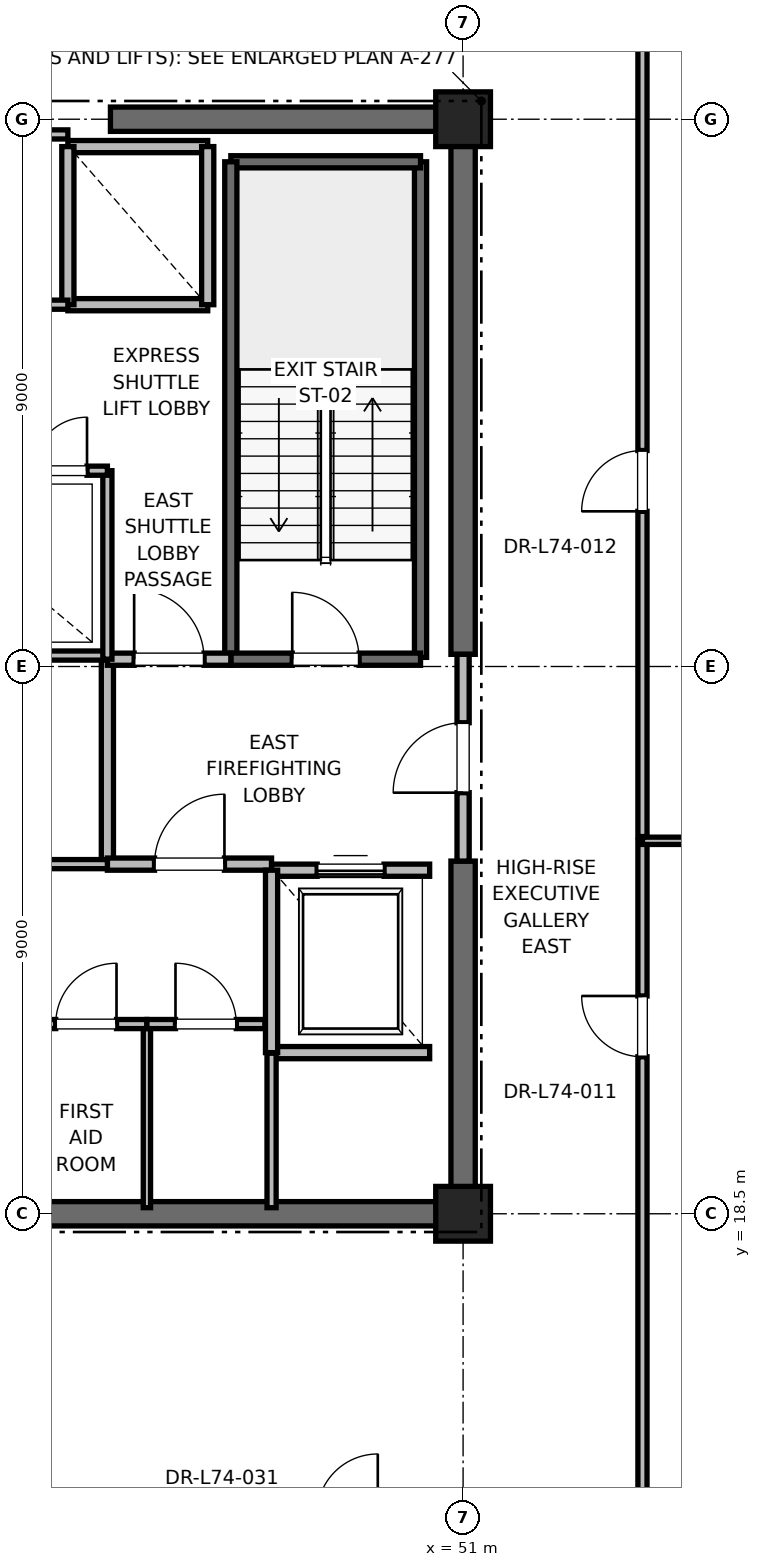
"""IFC4 building model, lengths in metres.
Left out: names, types, materials, properties, quantities, classifications, styles, units other than length and angle.
Written with IfcOpenShell. Run it as: python <this file> out.ifc"""

import sys

from ifc_helpers import new_model, si_unit, direction, frame, frame_2d, origin, origin_2d, place, context, subcontext, project, spatial, rectangle, extrude, element, fill, save


model = new_model("IFC4")
c1 = context("Model", 3, precision=1e-05, world=origin(), true_north=direction((0.0, 1.0)))
c2 = subcontext(c1, "Body", "Model", "MODEL_VIEW")
j1 = project(units=[si_unit("LENGTHUNIT", "METRE"), si_unit("PLANEANGLEUNIT", "RADIAN")], contexts=[c1])
p1 = place(None, origin())
s1 = spatial("IfcSite", under=j1, at=p1, CompositionType="ELEMENT")
p2 = place(p1, origin())
s2 = spatial("IfcBuilding", under=s1, at=p2, CompositionType="ELEMENT")
p3 = place(p2, frame((0.0, 0.0, 318.8)))
s3 = spatial("IfcBuildingStorey", under=s2, at=p3, CompositionType="ELEMENT", Elevation=318.8)
for number, where, z_axis, x_axis in (
    (1, (51.0, 18.5, 0.0), (0.0, 0.0, 1.0), (1.0, 0.0, 0.0)),
    (2, (51.0, 36.5, 0.0), (0.0, 0.0, 1.0), (1.0, 0.0, 0.0)),
):
    element("IfcColumn", number, at=place(p3, frame(where, z_axis=z_axis, x_axis=x_axis)), inside=s3, PredefinedType="PILASTER", context=c2, shape_type="SweptSolid", body=[
        extrude(rectangle(XDim=0.9, YDim=0.9, at=origin_2d()), origin(), (0.0, 0.0, 1.0), 4.0),
    ])
p4 = place(p3, frame((41.8, 18.5, 0.0), z_axis=(0.0, 0.0, 1.0), x_axis=(1.0, 0.0, 0.0)))
e3 = element("IfcWall", 3, at=p4, inside=s3, PredefinedType="SHEAR", context=c2, shape_type="SweptSolid", body=[
    extrude(rectangle(XDim=9.2, YDim=0.4, at=frame_2d((4.6, 0.0))), origin(), (0.0, 0.0, 1.0), 3.785),
])
for number, where, z_axis, x_axis in (
    (4, (45.2, 36.5, 0.0), (0.0, 0.0, 1.0), (1.0, 0.0, 0.0)),
    (5, (51.0, 18.5, 0.0), (0.0, 0.0, 1.0), (0.0, 1.0, 0.0)),
):
    element("IfcWall", number, at=place(p3, frame(where, z_axis=z_axis, x_axis=x_axis)), inside=s3, PredefinedType="SHEAR", context=c2, shape_type="SweptSolid", body=[
        extrude(rectangle(XDim=5.8, YDim=0.4, at=frame_2d((2.9, 0.0))), origin(), (0.0, 0.0, 1.0), 3.785),
    ])
p5 = place(p3, frame((51.0, 27.7, 0.0), z_axis=(0.0, 0.0, 1.0), x_axis=(0.0, 1.0, 0.0)))
e6 = element("IfcWall", 6, at=p5, inside=s3, PredefinedType="SHEAR", context=c2, shape_type="SweptSolid", body=[
    extrude(rectangle(XDim=8.8, YDim=0.4, at=frame_2d((4.4, 0.0))), origin(), (0.0, 0.0, 1.0), 3.785),
])
p6 = place(p3, frame((50.3, 27.65, 0.0), z_axis=(0.0, 0.0, 1.0), x_axis=(0.0, 1.0, 0.0)))
e7 = element("IfcWall", 7, at=p6, inside=s3, PredefinedType="SOLIDWALL", context=c2, shape_type="SweptSolid", body=[
    extrude(rectangle(XDim=8.15, YDim=0.2, at=frame_2d((4.075, 0.0))), origin(), (0.0, 0.0, 1.0), 3.785),
])
p7 = place(p3, frame((47.18, 35.8, 0.0), z_axis=(0.0, 0.0, 1.0), x_axis=(1.0, 0.0, 0.0)))
e8 = element("IfcWall", 8, at=p7, inside=s3, PredefinedType="SOLIDWALL", context=c2, shape_type="SweptSolid", body=[
    extrude(rectangle(XDim=3.12, YDim=0.2, at=frame_2d((1.56, 0.0))), origin(), (0.0, 0.0, 1.0), 3.785),
])
p8 = place(p3, frame((47.18, 27.62, 0.0), z_axis=(0.0, 0.0, 1.0), x_axis=(0.0, 1.0, 0.0)))
e9 = element("IfcWall", 9, at=p8, inside=s3, PredefinedType="SOLIDWALL", context=c2, shape_type="SweptSolid", body=[
    extrude(rectangle(XDim=8.18, YDim=0.2, at=frame_2d((4.09, 0.0))), origin(), (0.0, 0.0, 1.0), 3.785),
])
p9 = place(p3, frame((47.18, 27.62, 0.0), z_axis=(0.0, 0.0, 1.0), x_axis=(1.0, 0.0, 0.0)))
e10 = element("IfcWall", 10, at=p9, inside=s3, PredefinedType="SOLIDWALL", context=c2, shape_type="SweptSolid", body=[
    extrude(rectangle(XDim=3.12, YDim=0.2, at=frame_2d((1.56, 0.0))), origin(), (0.0, 0.0, 1.0), 3.785),
])
p10 = place(p9, frame((1.01, 0.0, 0.0)))
e11 = element("IfcOpeningElement", 11, at=p10, cuts=e10, PredefinedType="OPENING", context=c2, shape_type="SweptSolid", body=[
    extrude(rectangle(XDim=1.1, YDim=2.15, at=frame_2d((0.55, 1.075))), frame((0.0, 0.1, 0.0), z_axis=(0.0, -1.0, 0.0), x_axis=(1.0, 0.0, 0.0)), (0.0, 0.0, 1.0), 0.2),
])
p11 = place(p3, frame((45.15, 24.25, 0.0), z_axis=(0.0, 0.0, 1.0), x_axis=(0.0, 1.0, 0.0)))
e12 = element("IfcWall", 12, at=p11, inside=s3, PredefinedType="PARTITIONING", context=c2, shape_type="SweptSolid", body=[
    extrude(rectangle(XDim=3.37, YDim=0.2, at=frame_2d((1.685, 0.0))), origin(), (0.0, 0.0, 1.0), 3.785),
])
p12 = place(p3, frame((45.15, 24.25, 0.0), z_axis=(0.0, 0.0, 1.0), x_axis=(1.0, 0.0, 0.0)))
e13 = element("IfcWall", 13, at=p12, inside=s3, PredefinedType="PARTITIONING", context=c2, shape_type="SweptSolid", body=[
    extrude(rectangle(XDim=2.7, YDim=0.2, at=frame_2d((1.35, 0.0))), origin(), (0.0, 0.0, 1.0), 3.785),
])
p13 = place(p12, frame((0.775, 0.0, 0.0)))
e14 = element("IfcOpeningElement", 14, at=p13, cuts=e13, PredefinedType="OPENING", context=c2, shape_type="SweptSolid", body=[
    extrude(rectangle(XDim=1.15, YDim=2.2, at=frame_2d((0.575, 1.1))), frame((0.0, 0.1, 0.0), z_axis=(0.0, -1.0, 0.0), x_axis=(1.0, 0.0, 0.0)), (0.0, 0.0, 1.0), 0.2),
])
p14 = place(p3, frame((45.15, 27.62, 0.0), z_axis=(0.0, 0.0, 1.0), x_axis=(1.0, 0.0, 0.0)))
e15 = element("IfcWall", 15, at=p14, inside=s3, PredefinedType="PARTITIONING", context=c2, shape_type="SweptSolid", body=[
    extrude(rectangle(XDim=2.03, YDim=0.2, at=frame_2d((1.015, 0.0))), origin(), (0.0, 0.0, 1.0), 3.785),
])
p15 = place(p14, frame((0.44, 0.0, 0.0)))
e16 = element("IfcOpeningElement", 16, at=p15, cuts=e15, PredefinedType="OPENING", context=c2, shape_type="SweptSolid", body=[
    extrude(rectangle(XDim=1.15, YDim=2.2, at=frame_2d((0.575, 1.1))), frame((0.0, 0.1, 0.0), z_axis=(0.0, -1.0, 0.0), x_axis=(1.0, 0.0, 0.0)), (0.0, 0.0, 1.0), 0.2),
])
p16 = place(p3, frame((51.0, 24.3, 0.0), z_axis=(0.0, 0.0, 1.0), x_axis=(0.0, 1.0, 0.0)))
e17 = element("IfcWall", 17, at=p16, inside=s3, PredefinedType="PARTITIONING", context=c2, shape_type="SweptSolid", body=[
    extrude(rectangle(XDim=3.4, YDim=0.2, at=frame_2d((1.7, 0.0))), origin(), (0.0, 0.0, 1.0), 2.865),
])
p17 = place(p16, frame((1.125, 0.0, 0.0)))
e18 = element("IfcOpeningElement", 18, at=p17, cuts=e17, PredefinedType="OPENING", context=c2, shape_type="SweptSolid", body=[
    extrude(rectangle(XDim=1.15, YDim=2.2, at=frame_2d((0.575, 1.1))), frame((0.0, 0.1, 0.0), z_axis=(0.0, -1.0, 0.0), x_axis=(1.0, 0.0, 0.0)), (0.0, 0.0, 1.0), 0.2),
])
p18 = place(p3, frame((47.85, 21.15, 0.0), z_axis=(0.0, 0.0, 1.0), x_axis=(1.0, 0.0, 0.0)))
e19 = element("IfcWall", 19, at=p18, inside=s3, PredefinedType="SOLIDWALL", context=c2, shape_type="SweptSolid", body=[
    extrude(rectangle(XDim=2.6, YDim=0.2, at=frame_2d((1.3, 0.0))), origin(), (0.0, 0.0, 1.0), 3.785),
])
p19 = place(p3, frame((50.45, 24.15, 0.0), z_axis=(0.0, 0.0, 1.0), x_axis=(-1.0, 0.0, 0.0)))
e20 = element("IfcWall", 20, at=p19, inside=s3, PredefinedType="SOLIDWALL", context=c2, shape_type="SweptSolid", body=[
    extrude(rectangle(XDim=2.6, YDim=0.2, at=frame_2d((1.3, 0.0))), origin(), (0.0, 0.0, 1.0), 2.865),
])
p20 = place(p19, frame((0.75, 0.0, 0.0)))
e21 = element("IfcOpeningElement", 21, at=p20, cuts=e20, PredefinedType="OPENING", context=c2, shape_type="SweptSolid", body=[
    extrude(rectangle(XDim=1.1, YDim=2.2, at=frame_2d((0.55, 1.1))), frame((0.0, 0.1, 0.0), z_axis=(0.0, -1.0, 0.0), x_axis=(1.0, 0.0, 0.0)), (0.0, 0.0, 1.0), 0.2),
])
p21 = place(p3, frame((47.85, 24.15, 0.0), z_axis=(0.0, 0.0, 1.0), x_axis=(0.0, -1.0, 0.0)))
e22 = element("IfcWall", 22, at=p21, inside=s3, PredefinedType="SOLIDWALL", context=c2, shape_type="SweptSolid", body=[
    extrude(rectangle(XDim=3.0, YDim=0.2, at=frame_2d((1.5, 0.0))), origin(), (0.0, 0.0, 1.0), 3.785),
])
p22 = place(p3, frame((44.5, 33.45, 0.0), z_axis=(0.0, 0.0, 1.0), x_axis=(1.0, 0.0, 0.0)))
e23 = element("IfcWall", 23, at=p22, inside=s3, PredefinedType="SOLIDWALL", context=c2, shape_type="SweptSolid", body=[
    extrude(rectangle(XDim=2.3, YDim=0.2, at=frame_2d((1.15, 0.0))), origin(), (0.0, 0.0, 1.0), 3.785),
])
p23 = place(p3, frame((46.8, 36.05, 0.0), z_axis=(0.0, 0.0, 1.0), x_axis=(-1.0, 0.0, 0.0)))
e24 = element("IfcWall", 24, at=p23, inside=s3, PredefinedType="SOLIDWALL", context=c2, shape_type="SweptSolid", body=[
    extrude(rectangle(XDim=2.3, YDim=0.2, at=frame_2d((1.15, 0.0))), origin(), (0.0, 0.0, 1.0), 2.865),
])
p24 = place(p3, frame((44.5, 36.05, 0.0), z_axis=(0.0, 0.0, 1.0), x_axis=(0.0, -1.0, 0.0)))
e25 = element("IfcWall", 25, at=p24, inside=s3, PredefinedType="SOLIDWALL", context=c2, shape_type="SweptSolid", body=[
    extrude(rectangle(XDim=2.6, YDim=0.2, at=frame_2d((1.3, 0.0))), origin(), (0.0, 0.0, 1.0), 2.865),
])
p25 = place(p3, frame((46.8, 33.45, 0.0), z_axis=(0.0, 0.0, 1.0), x_axis=(0.0, 1.0, 0.0)))
e26 = element("IfcWall", 26, at=p25, inside=s3, PredefinedType="SOLIDWALL", context=c2, shape_type="SweptSolid", body=[
    extrude(rectangle(XDim=2.6, YDim=0.2, at=frame_2d((1.3, 0.0))), origin(), (0.0, 0.0, 1.0), 3.785),
])
p26 = place(p3, frame((41.56, 27.68, 0.0), z_axis=(0.0, 0.0, 1.0), x_axis=(1.0, 0.0, 0.0)))
e27 = element("IfcWall", 27, at=p26, inside=s3, PredefinedType="PARTITIONING", context=c2, shape_type="SweptSolid", body=[
    extrude(rectangle(XDim=3.59, YDim=0.15, at=frame_2d((1.795, 0.0))), origin(), (0.0, 0.0, 1.0), 2.85),
])
p27 = place(p3, frame((47.85, 18.6, 0.0), z_axis=(0.0, 0.0, 1.0), x_axis=(0.0, 1.0, 0.0)))
e28 = element("IfcWall", 28, at=p27, inside=s3, PredefinedType="PARTITIONING", context=c2, shape_type="SweptSolid", body=[
    extrude(rectangle(XDim=2.54, YDim=0.15, at=frame_2d((1.27, 0.0))), origin(), (0.0, 0.0, 1.0), 2.85),
])
p28 = place(p3, frame((45.8, 18.6, 0.0), z_axis=(0.0, 0.0, 1.0), x_axis=(0.0, 1.0, 0.0)))
e29 = element("IfcWall", 29, at=p28, inside=s3, PredefinedType="PARTITIONING", context=c2, shape_type="SweptSolid", body=[
    extrude(rectangle(XDim=3.02, YDim=0.12, at=frame_2d((1.51, 0.0))), origin(), (0.0, 0.0, 1.0), 2.85),
])
p29 = place(p3, frame((43.8, 21.62, 0.0), z_axis=(0.0, 0.0, 1.0), x_axis=(1.0, 0.0, 0.0)))
e30 = element("IfcWall", 30, at=p29, inside=s3, PredefinedType="PARTITIONING", context=c2, shape_type="SweptSolid", body=[
    extrude(rectangle(XDim=2.0, YDim=0.15, at=frame_2d((1.0, 0.0))), origin(), (0.0, 0.0, 1.0), 2.85),
])
p30 = place(p29, frame((0.5, 0.0, 0.0)))
e31 = element("IfcOpeningElement", 31, at=p30, cuts=e30, PredefinedType="OPENING", context=c2, shape_type="SweptSolid", body=[
    extrude(rectangle(XDim=1.0, YDim=2.15, at=frame_2d((0.5, 1.075))), frame((0.0, 0.075, 0.0), z_axis=(0.0, -1.0, 0.0), x_axis=(1.0, 0.0, 0.0)), (0.0, 0.0, 1.0), 0.15),
])
p31 = place(p3, frame((45.8, 21.62, 0.0), z_axis=(0.0, 0.0, 1.0), x_axis=(1.0, 0.0, 0.0)))
e32 = element("IfcWall", 32, at=p31, inside=s3, PredefinedType="PARTITIONING", context=c2, shape_type="SweptSolid", body=[
    extrude(rectangle(XDim=1.94, YDim=0.15, at=frame_2d((0.97, 0.0))), origin(), (0.0, 0.0, 1.0), 2.85),
])
p32 = place(p31, frame((0.47, 0.0, 0.0)))
e33 = element("IfcOpeningElement", 33, at=p32, cuts=e32, PredefinedType="OPENING", context=c2, shape_type="SweptSolid", body=[
    extrude(rectangle(XDim=1.0, YDim=2.15, at=frame_2d((0.5, 1.075))), frame((0.0, 0.075, 0.0), z_axis=(0.0, -1.0, 0.0), x_axis=(1.0, 0.0, 0.0)), (0.0, 0.0, 1.0), 0.15),
])
p33 = place(p3, frame((41.76, 24.25, 0.0), z_axis=(0.0, 0.0, 1.0), x_axis=(1.0, 0.0, 0.0)))
e34 = element("IfcWall", 34, at=p33, inside=s3, PredefinedType="PARTITIONING", context=c2, shape_type="SweptSolid", body=[
    extrude(rectangle(XDim=3.39, YDim=0.15, at=frame_2d((1.695, 0.0))), origin(), (0.0, 0.0, 1.0), 2.85),
])
p34 = place(p33, frame((1.255, 0.0, 0.0)))
e35 = element("IfcOpeningElement", 35, at=p34, cuts=e34, PredefinedType="OPENING", context=c2, shape_type="SweptSolid", body=[
    extrude(rectangle(XDim=0.88, YDim=2.1, at=frame_2d((0.44, 1.05))), frame((0.0, 0.075, 0.0), z_axis=(0.0, -1.0, 0.0), x_axis=(1.0, 0.0, 0.0)), (0.0, 0.0, 1.0), 0.15),
])
p35 = place(p3, frame((45.15, 27.62, 0.0), z_axis=(0.0, 0.0, 1.0), x_axis=(0.0, 1.0, 0.0)))
e36 = element("IfcWall", 36, at=p35, inside=s3, PredefinedType="PARTITIONING", context=c2, shape_type="SweptSolid", body=[
    extrude(rectangle(XDim=3.1, YDim=0.15, at=frame_2d((1.55, 0.0))), origin(), (0.0, 0.0, 1.0), 2.85),
])
p36 = place(p3, frame((43.6, 30.72, 0.0), z_axis=(0.0, 0.0, 1.0), x_axis=(1.0, 0.0, 0.0)))
e37 = element("IfcWall", 37, at=p36, inside=s3, PredefinedType="PARTITIONING", context=c2, shape_type="SweptSolid", body=[
    extrude(rectangle(XDim=1.55, YDim=0.15, at=frame_2d((0.775, 0.0))), origin(), (0.0, 0.0, 1.0), 2.85),
])
p37 = place(p36, frame((0.335, 0.0, 0.0)))
e38 = element("IfcOpeningElement", 38, at=p37, cuts=e37, PredefinedType="OPENING", context=c2, shape_type="SweptSolid", body=[
    extrude(rectangle(XDim=0.88, YDim=2.1, at=frame_2d((0.44, 1.05))), frame((0.0, 0.075, 0.0), z_axis=(0.0, -1.0, 0.0), x_axis=(1.0, 0.0, 0.0)), (0.0, 0.0, 1.0), 0.15),
])
p38 = place(p3, frame((41.56, 36.25, 0.0), z_axis=(0.0, 0.0, 1.0), x_axis=(1.0, 0.0, 0.0)))
e39 = element("IfcWall", 39, at=p38, inside=s3, PredefinedType="PARTITIONING", context=c2, shape_type="SweptSolid", body=[
    extrude(rectangle(XDim=2.94, YDim=0.15, at=frame_2d((1.47, 0.0))), origin(), (0.0, 0.0, 1.0), 2.85),
])
p39 = place(p3, frame((41.56, 33.45, 0.0), z_axis=(0.0, 0.0, 1.0), x_axis=(1.0, 0.0, 0.0)))
e40 = element("IfcWall", 40, at=p39, inside=s3, PredefinedType="PARTITIONING", context=c2, shape_type="SweptSolid", body=[
    extrude(rectangle(XDim=2.94, YDim=0.15, at=frame_2d((1.47, 0.0))), origin(), (0.0, 0.0, 1.0), 2.85),
])
p40 = place(p39, frame((1.03, 0.0, 0.0)))
e41 = element("IfcOpeningElement", 41, at=p40, cuts=e40, PredefinedType="OPENING", context=c2, shape_type="SweptSolid", body=[
    extrude(rectangle(XDim=0.88, YDim=2.1, at=frame_2d((0.44, 1.05))), frame((0.0, 0.075, 0.0), z_axis=(0.0, -1.0, 0.0), x_axis=(1.0, 0.0, 0.0)), (0.0, 0.0, 1.0), 0.15),
])
p41 = place(p3, frame((53.95, 9.584, 0.0), z_axis=(0.0, 0.0, 1.0), x_axis=(0.0, 1.0, 0.0)))
e42 = element("IfcWall", 42, at=p41, inside=s3, PredefinedType="PARTITIONING", context=c2, shape_type="SweptSolid", body=[
    extrude(rectangle(XDim=15.049, YDim=0.15, at=frame_2d((7.525, 0.0))), origin(), (0.0, 0.0, 1.0), 2.85),
])
p42 = place(p41, frame((11.497, 0.0, 0.0)))
e43 = element("IfcOpeningElement", 43, at=p42, cuts=e42, PredefinedType="OPENING", context=c2, shape_type="SweptSolid", body=[
    extrude(rectangle(XDim=1.0, YDim=2.15, at=frame_2d((0.5, 1.075))), frame((0.0, 0.075, 0.0), z_axis=(0.0, -1.0, 0.0), x_axis=(1.0, 0.0, 0.0)), (0.0, 0.0, 1.0), 0.15),
])
p43 = place(p3, frame((53.95, 24.634, 0.0), z_axis=(0.0, 0.0, 1.0), x_axis=(1.0, 0.0, 0.0)))
e44 = element("IfcWall", 44, at=p43, inside=s3, PredefinedType="PARTITIONING", context=c2, shape_type="SweptSolid", body=[
    extrude(rectangle(XDim=10.781, YDim=0.12, at=frame_2d((5.391, 0.0))), origin(), (0.0, 0.0, 1.0), 2.85),
])
p44 = place(p3, frame((53.95, 24.704, 0.0), z_axis=(0.0, 0.0, 1.0), x_axis=(0.0, 1.0, 0.0)))
e45 = element("IfcWall", 45, at=p44, inside=s3, PredefinedType="PARTITIONING", context=c2, shape_type="SweptSolid", body=[
    extrude(rectangle(XDim=20.712, YDim=0.15, at=frame_2d((10.356, 0.0))), origin(), (0.0, 0.0, 1.0), 2.85),
])
p45 = place(p44, frame((5.348, 0.0, 0.0)))
e46 = element("IfcOpeningElement", 46, at=p45, cuts=e45, PredefinedType="OPENING", context=c2, shape_type="SweptSolid", body=[
    extrude(rectangle(XDim=1.0, YDim=2.15, at=frame_2d((0.5, 1.075))), frame((0.0, 0.075, 0.0), z_axis=(0.0, -1.0, 0.0), x_axis=(1.0, 0.0, 0.0)), (0.0, 0.0, 1.0), 0.15),
])
p46 = place(p10, origin())
e47 = element("IfcDoor", 47, at=p46, inside=s3, OperationType="SINGLE_SWING_LEFT", PredefinedType="DOOR", context=c2, shape_type="SweptSolid", body=[
    extrude(rectangle(XDim=1.1, YDim=2.15, at=frame_2d((0.55, 1.075))), frame((0.0, 0.025, 0.0), z_axis=(0.0, -1.0, 0.0), x_axis=(1.0, 0.0, 0.0)), (0.0, 0.0, 1.0), 0.05),
])
fill(e11, e47)
p47 = place(p13, origin())
e48 = element("IfcDoor", 48, at=p47, inside=s3, OperationType="SINGLE_SWING_RIGHT", PredefinedType="DOOR", context=c2, shape_type="SweptSolid", body=[
    extrude(rectangle(XDim=1.15, YDim=2.2, at=frame_2d((0.575, 1.1))), frame((0.0, 0.025, 0.0), z_axis=(0.0, -1.0, 0.0), x_axis=(1.0, 0.0, 0.0)), (0.0, 0.0, 1.0), 0.05),
])
fill(e14, e48)
p48 = place(p15, origin())
e49 = element("IfcDoor", 49, at=p48, inside=s3, OperationType="SINGLE_SWING_LEFT", PredefinedType="DOOR", context=c2, shape_type="SweptSolid", body=[
    extrude(rectangle(XDim=1.15, YDim=2.2, at=frame_2d((0.575, 1.1))), frame((0.0, 0.025, 0.0), z_axis=(0.0, -1.0, 0.0), x_axis=(1.0, 0.0, 0.0)), (0.0, 0.0, 1.0), 0.05),
])
fill(e16, e49)
p49 = place(p17, origin())
e50 = element("IfcDoor", 50, at=p49, inside=s3, OperationType="SINGLE_SWING_LEFT", PredefinedType="DOOR", context=c2, shape_type="SweptSolid", body=[
    extrude(rectangle(XDim=1.15, YDim=2.2, at=frame_2d((0.575, 1.1))), frame((0.0, 0.025, 0.0), z_axis=(0.0, -1.0, 0.0), x_axis=(1.0, 0.0, 0.0)), (0.0, 0.0, 1.0), 0.05),
])
fill(e18, e50)
p50 = place(p20, origin())
e51 = element("IfcDoor", 51, at=p50, inside=s3, OperationType="SLIDING_TO_RIGHT", PredefinedType="DOOR", context=c2, shape_type="SweptSolid", body=[
    extrude(rectangle(XDim=1.1, YDim=2.2, at=frame_2d((0.55, 1.1))), frame((0.0, 0.025, 0.0), z_axis=(0.0, -1.0, 0.0), x_axis=(1.0, 0.0, 0.0)), (0.0, 0.0, 1.0), 0.05),
])
fill(e21, e51)
p51 = place(p30, origin())
e52 = element("IfcDoor", 52, at=p51, inside=s3, OperationType="SINGLE_SWING_RIGHT", PredefinedType="DOOR", context=c2, shape_type="SweptSolid", body=[
    extrude(rectangle(XDim=1.0, YDim=2.15, at=frame_2d((0.5, 1.075))), frame((0.0, 0.025, 0.0), z_axis=(0.0, -1.0, 0.0), x_axis=(1.0, 0.0, 0.0)), (0.0, 0.0, 1.0), 0.05),
])
fill(e31, e52)
p52 = place(p32, origin())
e53 = element("IfcDoor", 53, at=p52, inside=s3, OperationType="SINGLE_SWING_LEFT", PredefinedType="DOOR", context=c2, shape_type="SweptSolid", body=[
    extrude(rectangle(XDim=1.0, YDim=2.15, at=frame_2d((0.5, 1.075))), frame((0.0, 0.025, 0.0), z_axis=(0.0, -1.0, 0.0), x_axis=(1.0, 0.0, 0.0)), (0.0, 0.0, 1.0), 0.05),
])
fill(e33, e53)
p53 = place(p37, origin())
e54 = element("IfcDoor", 54, at=p53, inside=s3, OperationType="SINGLE_SWING_RIGHT", PredefinedType="DOOR", context=c2, shape_type="SweptSolid", body=[
    extrude(rectangle(XDim=0.88, YDim=2.1, at=frame_2d((0.44, 1.05))), frame((0.0, 0.025, 0.0), z_axis=(0.0, -1.0, 0.0), x_axis=(1.0, 0.0, 0.0)), (0.0, 0.0, 1.0), 0.05),
])
fill(e38, e54)
p54 = place(p42, origin())
e55 = element("IfcDoor", 55, at=p54, inside=s3, OperationType="SINGLE_SWING_RIGHT", PredefinedType="DOOR", context=c2, shape_type="SweptSolid", body=[
    extrude(rectangle(XDim=1.0, YDim=2.15, at=frame_2d((0.5, 1.075))), frame((0.0, 0.025, 0.0), z_axis=(0.0, -1.0, 0.0), x_axis=(1.0, 0.0, 0.0)), (0.0, 0.0, 1.0), 0.05),
])
fill(e43, e55)
p55 = place(p45, origin())
e56 = element("IfcDoor", 56, at=p55, inside=s3, OperationType="SINGLE_SWING_LEFT", PredefinedType="DOOR", context=c2, shape_type="SweptSolid", body=[
    extrude(rectangle(XDim=1.0, YDim=2.15, at=frame_2d((0.5, 1.075))), frame((0.0, 0.025, 0.0), z_axis=(0.0, -1.0, 0.0), x_axis=(1.0, 0.0, 0.0)), (0.0, 0.0, 1.0), 0.05),
])
fill(e46, e56)
save(model, sys.argv[1])
